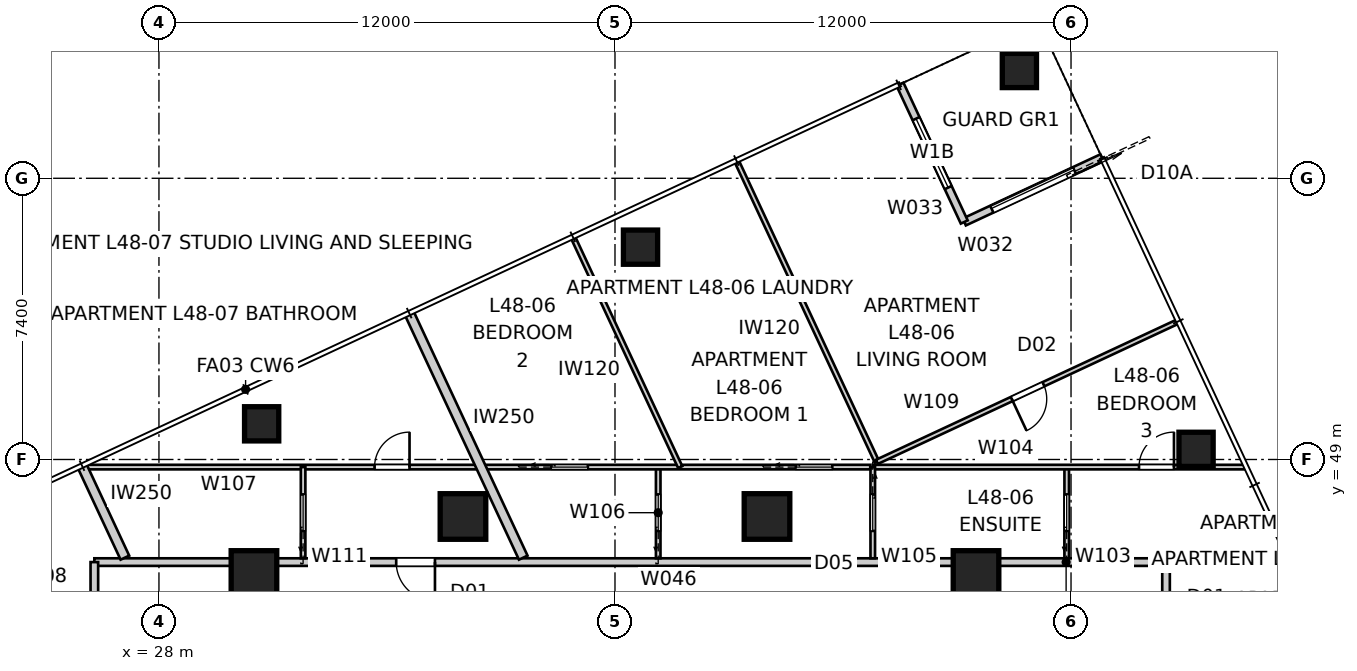
"""IFC4 building model, lengths in metres.
Left out: names, types, materials, properties, quantities, classifications, styles, units other than length and angle.
Written with IfcOpenShell. Run it as: python <this file> out.ifc"""

import sys

from ifc_helpers import new_model, si_unit, direction, frame, frame_2d, origin, origin_2d, place, context, subcontext, project, spatial, rectangle, extrude, element, fill, save


model = new_model("IFC4")
c1 = context("Model", 3, precision=1e-05, world=origin(), true_north=direction((0.0, 1.0)))
c2 = subcontext(c1, "Body", "Model", "MODEL_VIEW")
j1 = project(units=[si_unit("LENGTHUNIT", "METRE"), si_unit("PLANEANGLEUNIT", "RADIAN")], contexts=[c1])
p1 = place(None, origin())
s1 = spatial("IfcSite", under=j1, at=p1, CompositionType="ELEMENT")
p2 = place(p1, origin())
s2 = spatial("IfcBuilding", under=s1, at=p2, CompositionType="ELEMENT")
p3 = place(p2, frame((0.0, 0.0, 176.0)))
s3 = spatial("IfcBuildingStorey", under=s2, at=p3, CompositionType="ELEMENT", Elevation=176.0)
for number, where, z_axis, x_axis in (
    (1, (55.29, 49.267, -0.15), (0.0, 0.0, 1.0), (1.0, 0.0, 0.0)),
    (2, (50.641, 59.236, -0.15), (0.0, 0.0, 1.0), (1.0, 0.0, 0.0)),
    (3, (40.672, 54.588, -0.15), (0.0, 0.0, 1.0), (1.0, 0.0, 0.0)),
    (4, (30.702, 49.939, -0.15), (0.0, 0.0, 1.0), (1.0, 0.0, 0.0)),
):
    element("IfcColumn", number, at=place(p3, frame(where, z_axis=z_axis, x_axis=x_axis)), inside=s3, PredefinedType="COLUMN", context=c2, shape_type="SweptSolid", body=[
        extrude(rectangle(XDim=0.9, YDim=0.9, at=origin_2d()), origin(), (0.0, 0.0, 1.0), 3.55),
    ])
for number, where, z_axis, x_axis in (
    (5, (49.5, 46.0, 0.0), (0.0, 0.0, 1.0), (1.0, 0.0, 0.0)),
    (6, (44.0, 47.5, 0.0), (0.0, 0.0, 1.0), (1.0, 0.0, 0.0)),
    (7, (36.0, 47.5, 0.0), (0.0, 0.0, 1.0), (1.0, 0.0, 0.0)),
    (8, (30.5, 46.0, 0.0), (0.0, 0.0, 1.0), (1.0, 0.0, 0.0)),
):
    element("IfcColumn", number, at=place(p3, frame(where, z_axis=z_axis, x_axis=x_axis)), inside=s3, PredefinedType="COLUMN", context=c2, shape_type="SweptSolid", body=[
        extrude(rectangle(XDim=1.2, YDim=1.2, at=origin_2d()), origin(), (0.0, 0.0, 1.0), 3.4),
    ])
p4 = place(p3, frame((52.815, 56.94, 0.0), z_axis=(0.0, 0.0, 1.0), x_axis=(-0.906289140828, -0.422658246362, 0.0)))
e9 = element("IfcWall", 9, at=p4, inside=s3, PredefinedType="SOLIDWALL", context=c2, shape_type="SweptSolid", body=[
    extrude(rectangle(XDim=4.0, YDim=0.2, at=frame_2d((2.0, 0.0))), origin(), (0.0, 0.0, 1.0), 3.25),
])
p5 = place(p4, frame((0.8, 0.0, 0.0)))
e10 = element("IfcOpeningElement", 10, at=p5, cuts=e9, PredefinedType="OPENING", context=c2, shape_type="SweptSolid", body=[
    extrude(rectangle(XDim=2.4, YDim=2.1, at=frame_2d((1.2, 1.05))), frame((0.0, 0.11, 0.0), z_axis=(0.0, -1.0, 0.0), x_axis=(1.0, 0.0, 0.0)), (0.0, 0.0, 1.0), 0.22),
])
p6 = place(p3, frame((49.19, 55.25, 0.0), z_axis=(0.0, 0.0, 1.0), x_axis=(-0.422658246362, 0.906289140828, 0.0)))
e11 = element("IfcWall", 11, at=p6, inside=s3, PredefinedType="SOLIDWALL", context=c2, shape_type="SweptSolid", body=[
    extrude(rectangle(XDim=4.0, YDim=0.2, at=frame_2d((2.0, 0.0))), origin(), (0.0, 0.0, 1.0), 3.25),
])
p7 = place(p6, frame((1.0, 0.0, 0.45)))
e12 = element("IfcOpeningElement", 12, at=p7, cuts=e11, PredefinedType="OPENING", context=c2, shape_type="SweptSolid", body=[
    extrude(rectangle(XDim=2.0, YDim=1.8, at=frame_2d((1.0, 0.9))), frame((0.0, 0.11, 0.0), z_axis=(0.0, -1.0, 0.0), x_axis=(1.0, 0.0, 0.0)), (0.0, 0.0, 1.0), 0.22),
])
p8 = place(p3, frame((54.5, 13.7, 0.0), z_axis=(0.0, 0.0, 1.0), x_axis=(0.0, 1.0, 0.0)))
e13 = element("IfcWall", 13, at=p8, inside=s3, PredefinedType="PARTITIONING", context=c2, shape_type="SweptSolid", body=[
    extrude(rectangle(XDim=32.6, YDim=0.2, at=frame_2d((16.3, 0.0))), origin(), (0.0, 0.0, 1.0), 3.25),
])
p9 = place(p8, frame((3.326, 0.0, 0.0)))
e14 = element("IfcOpeningElement", 14, at=p9, cuts=e13, PredefinedType="OPENING", context=c2, shape_type="SweptSolid", body=[
    extrude(rectangle(XDim=1.02, YDim=2.34, at=frame_2d((0.51, 1.17))), frame((0.0, 0.11, 0.0), z_axis=(0.0, -1.0, 0.0), x_axis=(1.0, 0.0, 0.0)), (0.0, 0.0, 1.0), 0.22),
])
p10 = place(p8, frame((19.161, 0.0, 0.0)))
e15 = element("IfcOpeningElement", 15, at=p10, cuts=e13, PredefinedType="OPENING", context=c2, shape_type="SweptSolid", body=[
    extrude(rectangle(XDim=1.02, YDim=2.34, at=frame_2d((0.51, 1.17))), frame((0.0, 0.11, 0.0), z_axis=(0.0, -1.0, 0.0), x_axis=(1.0, 0.0, 0.0)), (0.0, 0.0, 1.0), 0.22),
])
p11 = place(p8, frame((29.73, 0.0, 0.0)))
e16 = element("IfcOpeningElement", 16, at=p11, cuts=e13, PredefinedType="OPENING", context=c2, shape_type="SweptSolid", body=[
    extrude(rectangle(XDim=1.02, YDim=2.34, at=frame_2d((0.51, 1.17))), frame((0.0, 0.11, 0.0), z_axis=(0.0, -1.0, 0.0), x_axis=(1.0, 0.0, 0.0)), (0.0, 0.0, 1.0), 0.22),
])
p12 = place(p8, frame((23.904, 0.0, 0.0)))
e17 = element("IfcOpeningElement", 17, at=p12, cuts=e13, PredefinedType="OPENING", context=c2, shape_type="SweptSolid", body=[
    extrude(rectangle(XDim=1.02, YDim=2.34, at=frame_2d((0.51, 1.17))), frame((0.0, 0.11, 0.0), z_axis=(0.0, -1.0, 0.0), x_axis=(1.0, 0.0, 0.0)), (0.0, 0.0, 1.0), 0.22),
])
p13 = place(p3, frame((54.5, 46.3, 0.0), z_axis=(0.0, 0.0, 1.0), x_axis=(-1.0, 0.0, 0.0)))
e18 = element("IfcWall", 18, at=p13, inside=s3, PredefinedType="PARTITIONING", context=c2, shape_type="SweptSolid", body=[
    extrude(rectangle(XDim=5.258, YDim=0.2, at=frame_2d((2.629, 0.0))), origin(), (0.0, 0.0, 1.0), 3.25),
])
p14 = place(p3, frame((49.242, 46.3, 0.0), z_axis=(0.0, 0.0, 1.0), x_axis=(-1.0, 0.0, 0.0)))
e19 = element("IfcWall", 19, at=p14, inside=s3, PredefinedType="PARTITIONING", context=c2, shape_type="SweptSolid", body=[
    extrude(rectangle(XDim=1.683, YDim=0.2, at=frame_2d((0.842, 0.0))), origin(), (0.0, 0.0, 1.0), 2.55),
])
p15 = place(p3, frame((47.558, 46.3, 0.0), z_axis=(0.0, 0.0, 1.0), x_axis=(-1.0, 0.0, 0.0)))
e20 = element("IfcWall", 20, at=p15, inside=s3, PredefinedType="PARTITIONING", context=c2, shape_type="SweptSolid", body=[
    extrude(rectangle(XDim=15.117, YDim=0.2, at=frame_2d((7.558, 0.0))), origin(), (0.0, 0.0, 1.0), 3.25),
])
p16 = place(p15, frame((12.295, 0.0, 0.0)))
e21 = element("IfcOpeningElement", 21, at=p16, cuts=e20, PredefinedType="OPENING", context=c2, shape_type="SweptSolid", body=[
    extrude(rectangle(XDim=1.02, YDim=2.34, at=frame_2d((0.51, 1.17))), frame((0.0, 0.11, 0.0), z_axis=(0.0, -1.0, 0.0), x_axis=(1.0, 0.0, 0.0)), (0.0, 0.0, 1.0), 0.22),
])
p17 = place(p3, frame((32.442, 46.3, 0.0), z_axis=(0.0, 0.0, 1.0), x_axis=(-1.0, 0.0, 0.0)))
e22 = element("IfcWall", 22, at=p17, inside=s3, PredefinedType="PARTITIONING", context=c2, shape_type="SweptSolid", body=[
    extrude(rectangle(XDim=1.683, YDim=0.2, at=frame_2d((0.842, 0.0))), origin(), (0.0, 0.0, 1.0), 2.55),
])
p18 = place(p3, frame((30.758, 46.3, 0.0), z_axis=(0.0, 0.0, 1.0), x_axis=(-1.0, 0.0, 0.0)))
e23 = element("IfcWall", 23, at=p18, inside=s3, PredefinedType="PARTITIONING", context=c2, shape_type="SweptSolid", body=[
    extrude(rectangle(XDim=4.458, YDim=0.2, at=frame_2d((2.229, 0.0))), origin(), (0.0, 0.0, 1.0), 3.25),
])
p19 = place(p3, frame((26.3, 46.3, 0.0), z_axis=(0.0, 0.0, 1.0), x_axis=(0.0, -1.0, 0.0)))
e24 = element("IfcWall", 24, at=p19, inside=s3, PredefinedType="PARTITIONING", context=c2, shape_type="SweptSolid", body=[
    extrude(rectangle(XDim=32.6, YDim=0.2, at=frame_2d((16.3, 0.0))), origin(), (0.0, 0.0, 1.0), 3.25),
])
p20 = place(p19, frame((3.156, 0.0, 0.0)))
e25 = element("IfcOpeningElement", 25, at=p20, cuts=e24, PredefinedType="OPENING", context=c2, shape_type="SweptSolid", body=[
    extrude(rectangle(XDim=1.02, YDim=2.1, at=frame_2d((0.51, 1.05))), frame((0.0, 0.11, 0.0), z_axis=(0.0, -1.0, 0.0), x_axis=(1.0, 0.0, 0.0)), (0.0, 0.0, 1.0), 0.22),
])
p21 = place(p19, frame((14.68, 0.0, 0.0)))
e26 = element("IfcOpeningElement", 26, at=p21, cuts=e24, PredefinedType="OPENING", context=c2, shape_type="SweptSolid", body=[
    extrude(rectangle(XDim=1.02, YDim=2.34, at=frame_2d((0.51, 1.17))), frame((0.0, 0.11, 0.0), z_axis=(0.0, -1.0, 0.0), x_axis=(1.0, 0.0, 0.0)), (0.0, 0.0, 1.0), 0.22),
])
p22 = place(p19, frame((29.543, 0.0, 0.0)))
e27 = element("IfcOpeningElement", 27, at=p22, cuts=e24, PredefinedType="OPENING", context=c2, shape_type="SweptSolid", body=[
    extrude(rectangle(XDim=1.02, YDim=2.34, at=frame_2d((0.51, 1.17))), frame((0.0, 0.11, 0.0), z_axis=(0.0, -1.0, 0.0), x_axis=(1.0, 0.0, 0.0)), (0.0, 0.0, 1.0), 0.22),
])
p23 = place(p3, frame((34.585, 52.853, 0.0), z_axis=(0.0, 0.0, 1.0), x_axis=(0.422623839356, -0.906305186131, 0.0)))
e28 = element("IfcWall", 28, at=p23, inside=s3, PredefinedType="PARTITIONING", context=c2, shape_type="SweptSolid", body=[
    extrude(rectangle(XDim=7.101, YDim=0.25, at=frame_2d((3.551, 0.0))), origin(), (0.0, 0.0, 1.0), 3.25),
])
p24 = place(p3, frame((25.975, 48.838, 0.0), z_axis=(0.0, 0.0, 1.0), x_axis=(0.422590257842, -0.906320844943, 0.0)))
e29 = element("IfcWall", 29, at=p24, inside=s3, PredefinedType="PARTITIONING", context=c2, shape_type="SweptSolid", body=[
    extrude(rectangle(XDim=2.671, YDim=0.25, at=frame_2d((1.336, 0.0))), origin(), (0.0, 0.0, 1.0), 3.25),
])
p25 = place(p3, frame((51.886, 46.4, 0.0), z_axis=(0.0, 0.0, 1.0), x_axis=(0.0, 1.0, 0.0)))
e30 = element("IfcWall", 30, at=p25, inside=s3, PredefinedType="PARTITIONING", context=c2, shape_type="SweptSolid", body=[
    extrude(rectangle(XDim=2.4, YDim=0.12, at=frame_2d((1.2, 0.0))), origin(), (0.0, 0.0, 1.0), 3.25),
])
p26 = place(p25, frame((0.72, 0.0, 0.0)))
e31 = element("IfcOpeningElement", 31, at=p26, cuts=e30, PredefinedType="OPENING", context=c2, shape_type="SweptSolid", body=[
    extrude(rectangle(XDim=0.96, YDim=2.1, at=frame_2d((0.48, 1.05))), frame((0.0, 0.07, 0.0), z_axis=(0.0, -1.0, 0.0), x_axis=(1.0, 0.0, 0.0)), (0.0, 0.0, 1.0), 0.14),
])
p27 = place(p3, frame((46.783, 48.8, 0.0), z_axis=(0.0, 0.0, 1.0), x_axis=(1.0, 0.0, 0.0)))
e32 = element("IfcWall", 32, at=p27, inside=s3, PredefinedType="PARTITIONING", context=c2, shape_type="SweptSolid", body=[
    extrude(rectangle(XDim=9.784, YDim=0.12, at=frame_2d((4.892, 0.0))), origin(), (0.0, 0.0, 1.0), 3.25),
])
p28 = place(p27, frame((7.006, 0.0, 0.0)))
e33 = element("IfcOpeningElement", 33, at=p28, cuts=e32, PredefinedType="OPENING", context=c2, shape_type="SweptSolid", body=[
    extrude(rectangle(XDim=0.92, YDim=2.34, at=frame_2d((0.46, 1.17))), frame((0.0, 0.07, 0.0), z_axis=(0.0, -1.0, 0.0), x_axis=(1.0, 0.0, 0.0)), (0.0, 0.0, 1.0), 0.14),
])
p29 = place(p3, frame((46.783, 48.8, 0.0), z_axis=(0.0, 0.0, 1.0), x_axis=(0.0, -1.0, 0.0)))
e34 = element("IfcWall", 34, at=p29, inside=s3, PredefinedType="PARTITIONING", context=c2, shape_type="SweptSolid", body=[
    extrude(rectangle(XDim=2.4, YDim=0.12, at=frame_2d((1.2, 0.0))), origin(), (0.0, 0.0, 1.0), 3.25),
])
p30 = place(p29, frame((0.72, 0.0, 0.0)))
e35 = element("IfcOpeningElement", 35, at=p30, cuts=e34, PredefinedType="OPENING", context=c2, shape_type="SweptSolid", body=[
    extrude(rectangle(XDim=0.96, YDim=2.1, at=frame_2d((0.48, 1.05))), frame((0.0, 0.07, 0.0), z_axis=(0.0, -1.0, 0.0), x_axis=(1.0, 0.0, 0.0)), (0.0, 0.0, 1.0), 0.14),
])
p31 = place(p3, frame((41.137, 46.4, 0.0), z_axis=(0.0, 0.0, 1.0), x_axis=(0.0, 1.0, 0.0)))
e36 = element("IfcWall", 36, at=p31, inside=s3, PredefinedType="PARTITIONING", context=c2, shape_type="SweptSolid", body=[
    extrude(rectangle(XDim=2.4, YDim=0.12, at=frame_2d((1.2, 0.0))), origin(), (0.0, 0.0, 1.0), 3.25),
])
p32 = place(p31, frame((0.72, 0.0, 0.0)))
e37 = element("IfcOpeningElement", 37, at=p32, cuts=e36, PredefinedType="OPENING", context=c2, shape_type="SweptSolid", body=[
    extrude(rectangle(XDim=0.96, YDim=2.1, at=frame_2d((0.48, 1.05))), frame((0.0, 0.07, 0.0), z_axis=(0.0, -1.0, 0.0), x_axis=(1.0, 0.0, 0.0)), (0.0, 0.0, 1.0), 0.14),
])
p33 = place(p3, frame((25.993, 48.8, 0.0), z_axis=(0.0, 0.0, 1.0), x_axis=(1.0, 0.0, 0.0)))
e38 = element("IfcWall", 38, at=p33, inside=s3, PredefinedType="PARTITIONING", context=c2, shape_type="SweptSolid", body=[
    extrude(rectangle(XDim=20.724, YDim=0.12, at=frame_2d((10.362, 0.0))), origin(), (0.0, 0.0, 1.0), 3.25),
])
p34 = place(p33, frame((7.681, 0.0, 0.0)))
e39 = element("IfcOpeningElement", 39, at=p34, cuts=e38, PredefinedType="OPENING", context=c2, shape_type="SweptSolid", body=[
    extrude(rectangle(XDim=0.92, YDim=2.34, at=frame_2d((0.46, 1.17))), frame((0.0, 0.07, 0.0), z_axis=(0.0, -1.0, 0.0), x_axis=(1.0, 0.0, 0.0)), (0.0, 0.0, 1.0), 0.14),
])
p35 = place(p33, frame((18.766, 0.0, 0.0)))
e40 = element("IfcOpeningElement", 40, at=p35, cuts=e38, PredefinedType="OPENING", context=c2, shape_type="SweptSolid", body=[
    extrude(rectangle(XDim=0.96, YDim=2.1, at=frame_2d((0.48, 1.05))), frame((0.0, 0.07, 0.0), z_axis=(0.0, -1.0, 0.0), x_axis=(1.0, 0.0, 0.0)), (0.0, 0.0, 1.0), 0.14),
])
p36 = place(p33, frame((12.333, 0.0, 0.0)))
e41 = element("IfcOpeningElement", 41, at=p36, cuts=e38, PredefinedType="OPENING", context=c2, shape_type="SweptSolid", body=[
    extrude(rectangle(XDim=0.96, YDim=2.1, at=frame_2d((0.48, 1.05))), frame((0.0, 0.07, 0.0), z_axis=(0.0, -1.0, 0.0), x_axis=(1.0, 0.0, 0.0)), (0.0, 0.0, 1.0), 0.14),
])
p37 = place(p3, frame((46.893, 48.937, 0.0), z_axis=(0.0, 0.0, 1.0), x_axis=(-0.422638395676, 0.906298398156, 0.0)))
e42 = element("IfcWall", 42, at=p37, inside=s3, PredefinedType="PARTITIONING", context=c2, shape_type="SweptSolid", body=[
    extrude(rectangle(XDim=8.71, YDim=0.12, at=frame_2d((4.355, 0.0))), origin(), (0.0, 0.0, 1.0), 3.25),
])
p38 = place(p3, frame((54.787, 52.618, 0.0), z_axis=(0.0, 0.0, 1.0), x_axis=(-0.906314140712, -0.422604635972, 0.0)))
e43 = element("IfcWall", 43, at=p38, inside=s3, PredefinedType="PARTITIONING", context=c2, shape_type="SweptSolid", body=[
    extrude(rectangle(XDim=8.71, YDim=0.12, at=frame_2d((4.355, 0.0))), origin(), (0.0, 0.0, 1.0), 3.25),
])
p39 = place(p38, frame((3.875, 0.0, 0.0)))
e44 = element("IfcOpeningElement", 44, at=p39, cuts=e43, PredefinedType="OPENING", context=c2, shape_type="SweptSolid", body=[
    extrude(rectangle(XDim=0.92, YDim=2.34, at=frame_2d((0.46, 1.17))), frame((0.0, 0.07, 0.0), z_axis=(0.0, -1.0, 0.0), x_axis=(1.0, 0.0, 0.0)), (0.0, 0.0, 1.0), 0.14),
])
p40 = place(p3, frame((41.716, 48.8, 0.0), z_axis=(0.0, 0.0, 1.0), x_axis=(-0.422642131948, 0.906296655793, 0.0)))
e45 = element("IfcWall", 45, at=p40, inside=s3, PredefinedType="PARTITIONING", context=c2, shape_type="SweptSolid", body=[
    extrude(rectangle(XDim=6.646, YDim=0.12, at=frame_2d((3.323, 0.0))), origin(), (0.0, 0.0, 1.0), 3.25),
])
p41 = place(p3, frame((31.793, 46.4, 0.0), z_axis=(0.0, 0.0, 1.0), x_axis=(0.0, 1.0, 0.0)))
e46 = element("IfcWall", 46, at=p41, inside=s3, PredefinedType="PARTITIONING", context=c2, shape_type="SweptSolid", body=[
    extrude(rectangle(XDim=2.4, YDim=0.12, at=frame_2d((1.2, 0.0))), origin(), (0.0, 0.0, 1.0), 3.25),
])
p42 = place(p41, frame((0.72, 0.0, 0.0)))
e47 = element("IfcOpeningElement", 47, at=p42, cuts=e46, PredefinedType="OPENING", context=c2, shape_type="SweptSolid", body=[
    extrude(rectangle(XDim=0.96, YDim=2.1, at=frame_2d((0.48, 1.05))), frame((0.0, 0.07, 0.0), z_axis=(0.0, -1.0, 0.0), x_axis=(1.0, 0.0, 0.0)), (0.0, 0.0, 1.0), 0.14),
])
p43 = place(p5, origin())
e48 = element("IfcDoor", 48, at=p43, inside=s3, OperationType="SLIDING_TO_LEFT", PredefinedType="DOOR", context=c2, shape_type="SweptSolid", body=[
    extrude(rectangle(XDim=2.4, YDim=2.1, at=frame_2d((1.2, 1.05))), frame((0.0, 0.025, 0.0), z_axis=(0.0, -1.0, 0.0), x_axis=(1.0, 0.0, 0.0)), (0.0, 0.0, 1.0), 0.05),
])
fill(e10, e48)
p44 = place(p7, origin())
e49 = element("IfcWindow", 49, at=p44, inside=s3, PartitioningType="SINGLE_PANEL", PredefinedType="WINDOW", context=c2, shape_type="SweptSolid", body=[
    extrude(rectangle(XDim=2.0, YDim=1.8, at=frame_2d((1.0, 0.9))), frame((0.0, 0.03, 0.0), z_axis=(0.0, -1.0, 0.0), x_axis=(1.0, 0.0, 0.0)), (0.0, 0.0, 1.0), 0.06),
])
fill(e12, e49)
p45 = place(p16, origin())
e50 = element("IfcDoor", 50, at=p45, inside=s3, OperationType="SINGLE_SWING_LEFT", PredefinedType="DOOR", context=c2, shape_type="SweptSolid", body=[
    extrude(rectangle(XDim=1.02, YDim=2.34, at=frame_2d((0.51, 1.17))), frame((0.0, 0.025, 0.0), z_axis=(0.0, -1.0, 0.0), x_axis=(1.0, 0.0, 0.0)), (0.0, 0.0, 1.0), 0.05),
])
fill(e21, e50)
p46 = place(p34, origin())
e51 = element("IfcDoor", 51, at=p46, inside=s3, OperationType="SINGLE_SWING_RIGHT", PredefinedType="DOOR", context=c2, shape_type="SweptSolid", body=[
    extrude(rectangle(XDim=0.92, YDim=2.34, at=frame_2d((0.46, 1.17))), frame((0.0, 0.025, 0.0), z_axis=(0.0, -1.0, 0.0), x_axis=(1.0, 0.0, 0.0)), (0.0, 0.0, 1.0), 0.05),
])
fill(e39, e51)
p47 = place(p42, origin())
e52 = element("IfcDoor", 52, at=p47, inside=s3, OperationType="SLIDING_TO_LEFT", PredefinedType="DOOR", context=c2, shape_type="SweptSolid", body=[
    extrude(rectangle(XDim=0.96, YDim=2.1, at=frame_2d((0.48, 1.05))), frame((0.0, 0.025, 0.0), z_axis=(0.0, -1.0, 0.0), x_axis=(1.0, 0.0, 0.0)), (0.0, 0.0, 1.0), 0.05),
])
fill(e47, e52)
p48 = place(p28, origin())
e53 = element("IfcDoor", 53, at=p48, inside=s3, OperationType="SINGLE_SWING_RIGHT", PredefinedType="DOOR", context=c2, shape_type="SweptSolid", body=[
    extrude(rectangle(XDim=0.92, YDim=2.34, at=frame_2d((0.46, 1.17))), frame((0.0, 0.025, 0.0), z_axis=(0.0, -1.0, 0.0), x_axis=(1.0, 0.0, 0.0)), (0.0, 0.0, 1.0), 0.05),
])
fill(e33, e53)
p49 = place(p26, origin())
e54 = element("IfcDoor", 54, at=p49, inside=s3, OperationType="SLIDING_TO_LEFT", PredefinedType="DOOR", context=c2, shape_type="SweptSolid", body=[
    extrude(rectangle(XDim=0.96, YDim=2.1, at=frame_2d((0.48, 1.05))), frame((0.0, 0.025, 0.0), z_axis=(0.0, -1.0, 0.0), x_axis=(1.0, 0.0, 0.0)), (0.0, 0.0, 1.0), 0.05),
])
fill(e31, e54)
p50 = place(p30, origin())
e55 = element("IfcDoor", 55, at=p50, inside=s3, OperationType="SLIDING_TO_LEFT", PredefinedType="DOOR", context=c2, shape_type="SweptSolid", body=[
    extrude(rectangle(XDim=0.96, YDim=2.1, at=frame_2d((0.48, 1.05))), frame((0.0, 0.025, 0.0), z_axis=(0.0, -1.0, 0.0), x_axis=(1.0, 0.0, 0.0)), (0.0, 0.0, 1.0), 0.05),
])
fill(e35, e55)
p51 = place(p35, origin())
e56 = element("IfcDoor", 56, at=p51, inside=s3, OperationType="SLIDING_TO_LEFT", PredefinedType="DOOR", context=c2, shape_type="SweptSolid", body=[
    extrude(rectangle(XDim=0.96, YDim=2.1, at=frame_2d((0.48, 1.05))), frame((0.0, 0.025, 0.0), z_axis=(0.0, -1.0, 0.0), x_axis=(1.0, 0.0, 0.0)), (0.0, 0.0, 1.0), 0.05),
])
fill(e40, e56)
p52 = place(p32, origin())
e57 = element("IfcDoor", 57, at=p52, inside=s3, OperationType="SLIDING_TO_LEFT", PredefinedType="DOOR", context=c2, shape_type="SweptSolid", body=[
    extrude(rectangle(XDim=0.96, YDim=2.1, at=frame_2d((0.48, 1.05))), frame((0.0, 0.025, 0.0), z_axis=(0.0, -1.0, 0.0), x_axis=(1.0, 0.0, 0.0)), (0.0, 0.0, 1.0), 0.05),
])
fill(e37, e57)
p53 = place(p36, origin())
e58 = element("IfcDoor", 58, at=p53, inside=s3, OperationType="SLIDING_TO_LEFT", PredefinedType="DOOR", context=c2, shape_type="SweptSolid", body=[
    extrude(rectangle(XDim=0.96, YDim=2.1, at=frame_2d((0.48, 1.05))), frame((0.0, 0.025, 0.0), z_axis=(0.0, -1.0, 0.0), x_axis=(1.0, 0.0, 0.0)), (0.0, 0.0, 1.0), 0.05),
])
fill(e41, e58)
p54 = place(p39, origin())
e59 = element("IfcDoor", 59, at=p54, inside=s3, OperationType="SINGLE_SWING_RIGHT", PredefinedType="DOOR", context=c2, shape_type="SweptSolid", body=[
    extrude(rectangle(XDim=0.92, YDim=2.34, at=frame_2d((0.46, 1.17))), frame((0.0, 0.025, 0.0), z_axis=(0.0, -1.0, 0.0), x_axis=(1.0, 0.0, 0.0)), (0.0, 0.0, 1.0), 0.05),
])
fill(e44, e59)
save(model, sys.argv[1])
